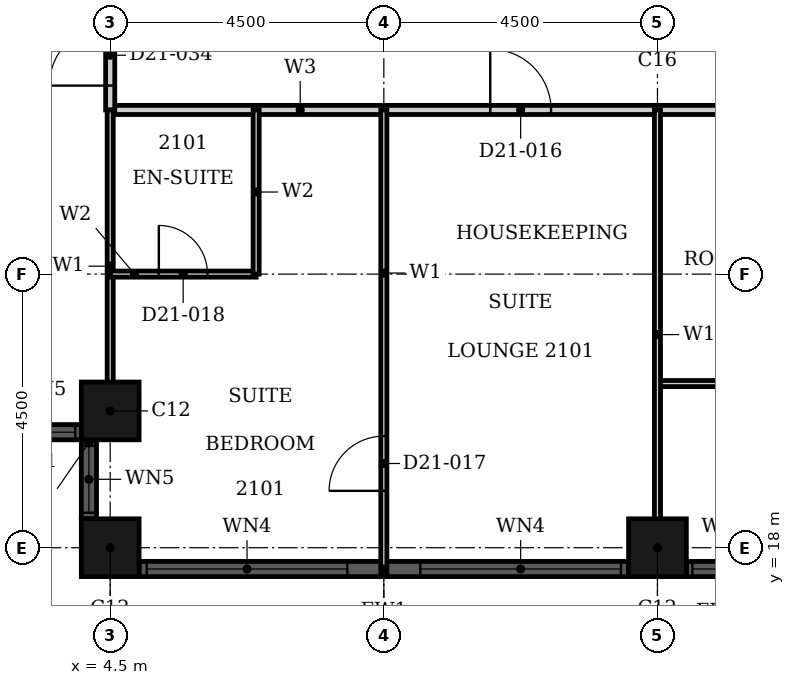
"""IFC4 building model, lengths in metres.
Left out: names, types, materials, properties, quantities, classifications, styles, units other than length and angle.
Written with IfcOpenShell. Run it as: python <this file> out.ifc"""

import sys

from ifc_helpers import new_model, si_unit, direction, frame, frame_2d, origin, origin_2d, place, context, subcontext, project, spatial, rectangle, hollow_rectangle, extrude, element, fill, save


model = new_model("IFC4")
c1 = context("Model", 3, precision=1e-05, world=origin(), true_north=direction((0.0, 1.0)))
c2 = subcontext(c1, "Body", "Model", "MODEL_VIEW")
j1 = project(units=[si_unit("LENGTHUNIT", "METRE"), si_unit("PLANEANGLEUNIT", "RADIAN")], contexts=[c1])
p1 = place(None, origin())
s1 = spatial("IfcSite", under=j1, at=p1, CompositionType="ELEMENT")
p2 = place(p1, origin())
s2 = spatial("IfcBuilding", under=s1, at=p2, CompositionType="ELEMENT")
p3 = place(p2, frame((0.0, 0.0, 88.8)))
s3 = spatial("IfcBuildingStorey", under=s2, at=p3, CompositionType="ELEMENT", Elevation=88.8)
for number, where, z_axis, x_axis in (
    (1, (4.5, 20.25, 0.0), (0.0, 0.0, 1.0), (1.0, 0.0, 0.0)),
    (2, (4.5, 18.0, 0.0), (0.0, 0.0, 1.0), (1.0, 0.0, 0.0)),
    (3, (13.5, 18.0, 0.0), (0.0, 0.0, 1.0), (1.0, 0.0, 0.0)),
):
    element("IfcColumn", number, at=place(p3, frame(where, z_axis=z_axis, x_axis=x_axis)), inside=s3, PredefinedType="COLUMN", context=c2, shape_type="SweptSolid", body=[
        extrude(hollow_rectangle(XDim=0.95, YDim=0.95, WallThickness=0.03, at=origin_2d()), origin(), (0.0, 0.0, 1.0), 3.6),
    ])
p4 = place(p3, frame((2.725, 19.9, 0.0), z_axis=(0.0, 0.0, 1.0), x_axis=(1.0, 0.0, 0.0)))
e4 = element("IfcWall", 4, at=p4, inside=s3, PredefinedType="SOLIDWALL", context=c2, shape_type="SweptSolid", body=[
    extrude(rectangle(XDim=1.3, YDim=0.25, at=frame_2d((0.65, 0.0))), origin(), (0.0, 0.0, 1.0), 3.6),
])
p5 = place(p4, frame((0.1, 0.0, 0.9)))
e5 = element("IfcOpeningElement", 5, at=p5, cuts=e4, PredefinedType="OPENING", context=c2, shape_type="SweptSolid", body=[
    extrude(rectangle(XDim=1.1, YDim=2.08, at=frame_2d((0.55, 1.04))), frame((0.0, 0.135, 0.0), z_axis=(0.0, -1.0, 0.0), x_axis=(1.0, 0.0, 0.0)), (0.0, 0.0, 1.0), 0.27),
])
p6 = place(p3, frame((4.15, 19.775, 0.0), z_axis=(0.0, 0.0, 1.0), x_axis=(0.0, -1.0, 0.0)))
e6 = element("IfcWall", 6, at=p6, inside=s3, PredefinedType="SOLIDWALL", context=c2, shape_type="SweptSolid", body=[
    extrude(rectangle(XDim=1.3, YDim=0.25, at=frame_2d((0.65, 0.0))), origin(), (0.0, 0.0, 1.0), 3.6),
])
p7 = place(p6, frame((0.1, 0.0, 0.9)))
e7 = element("IfcOpeningElement", 7, at=p7, cuts=e6, PredefinedType="OPENING", context=c2, shape_type="SweptSolid", body=[
    extrude(rectangle(XDim=1.1, YDim=2.08, at=frame_2d((0.55, 1.04))), frame((0.0, 0.135, 0.0), z_axis=(0.0, -1.0, 0.0), x_axis=(1.0, 0.0, 0.0)), (0.0, 0.0, 1.0), 0.27),
])
p8 = place(p3, frame((4.975, 17.65, 0.0), z_axis=(0.0, 0.0, 1.0), x_axis=(1.0, 0.0, 0.0)))
e8 = element("IfcWall", 8, at=p8, inside=s3, PredefinedType="SOLIDWALL", context=c2, shape_type="SweptSolid", body=[
    extrude(rectangle(XDim=8.05, YDim=0.25, at=frame_2d((4.025, 0.0))), origin(), (0.0, 0.0, 1.0), 3.6),
])
p9 = place(p8, frame((0.125, 0.0, 0.9)))
e9 = element("IfcOpeningElement", 9, at=p9, cuts=e8, PredefinedType="OPENING", context=c2, shape_type="SweptSolid", body=[
    extrude(rectangle(XDim=3.3, YDim=2.08, at=frame_2d((1.65, 1.04))), frame((0.0, 0.135, 0.0), z_axis=(0.0, -1.0, 0.0), x_axis=(1.0, 0.0, 0.0)), (0.0, 0.0, 1.0), 0.27),
])
p10 = place(p8, frame((4.625, 0.0, 0.9)))
e10 = element("IfcOpeningElement", 10, at=p10, cuts=e8, PredefinedType="OPENING", context=c2, shape_type="SweptSolid", body=[
    extrude(rectangle(XDim=3.3, YDim=2.08, at=frame_2d((1.65, 1.04))), frame((0.0, 0.135, 0.0), z_axis=(0.0, -1.0, 0.0), x_axis=(1.0, 0.0, 0.0)), (0.0, 0.0, 1.0), 0.27),
])
p11 = place(p3, frame((13.975, 17.65, 0.0), z_axis=(0.0, 0.0, 1.0), x_axis=(1.0, 0.0, 0.0)))
e11 = element("IfcWall", 11, at=p11, inside=s3, PredefinedType="SOLIDWALL", context=c2, shape_type="SweptSolid", body=[
    extrude(rectangle(XDim=1.3, YDim=0.25, at=frame_2d((0.65, 0.0))), origin(), (0.0, 0.0, 1.0), 3.6),
])
p12 = place(p11, frame((0.1, 0.0, 0.9)))
e12 = element("IfcOpeningElement", 12, at=p12, cuts=e11, PredefinedType="OPENING", context=c2, shape_type="SweptSolid", body=[
    extrude(rectangle(XDim=1.1, YDim=2.08, at=frame_2d((0.55, 1.04))), frame((0.0, 0.135, 0.0), z_axis=(0.0, -1.0, 0.0), x_axis=(1.0, 0.0, 0.0)), (0.0, 0.0, 1.0), 0.27),
])
p13 = place(p3, frame((4.5, 25.2, 0.0), z_axis=(0.0, 0.0, 1.0), x_axis=(1.0, 0.0, 0.0)))
e13 = element("IfcWall", 13, at=p13, inside=s3, PredefinedType="PARTITIONING", context=c2, shape_type="SweptSolid", body=[
    extrude(rectangle(XDim=11.7, YDim=0.15, at=frame_2d((5.85, 0.0))), origin(), (0.0, 0.0, 1.0), 3.3),
])
p14 = place(p13, frame((6.25, 0.0, 0.0)))
e14 = element("IfcOpeningElement", 14, at=p14, cuts=e13, PredefinedType="OPENING", context=c2, shape_type="SweptSolid", body=[
    extrude(rectangle(XDim=1.0, YDim=2.1, at=frame_2d((0.5, 1.05))), frame((0.0, 0.085, 0.0), z_axis=(0.0, -1.0, 0.0), x_axis=(1.0, 0.0, 0.0)), (0.0, 0.0, 1.0), 0.17),
])
p15 = place(p3, frame((4.5, 25.2, 0.0), z_axis=(0.0, 0.0, 1.0), x_axis=(0.0, 1.0, 0.0)))
e15 = element("IfcWall", 15, at=p15, inside=s3, PredefinedType="PARTITIONING", context=c2, shape_type="SweptSolid", body=[
    extrude(rectangle(XDim=1.8, YDim=0.15, at=frame_2d((0.9, 0.0))), origin(), (0.0, 0.0, 1.0), 3.3),
])
p16 = place(p15, frame((0.4, 0.0, 0.0)))
e16 = element("IfcOpeningElement", 16, at=p16, cuts=e15, PredefinedType="OPENING", context=c2, shape_type="SweptSolid", body=[
    extrude(rectangle(XDim=1.0, YDim=2.1, at=frame_2d((0.5, 1.05))), frame((0.0, 0.085, 0.0), z_axis=(0.0, -1.0, 0.0), x_axis=(1.0, 0.0, 0.0)), (0.0, 0.0, 1.0), 0.17),
])
p17 = place(p3, frame((13.5, 20.7, 0.0), z_axis=(0.0, 0.0, 1.0), x_axis=(1.0, 0.0, 0.0)))
e17 = element("IfcWall", 17, at=p17, inside=s3, PredefinedType="PARTITIONING", context=c2, shape_type="SweptSolid", body=[
    extrude(rectangle(XDim=2.7, YDim=0.1, at=frame_2d((1.35, 0.0))), origin(), (0.0, 0.0, 1.0), 3.3),
])
p18 = place(p3, frame((13.5, 17.81, 0.0), z_axis=(0.0, 0.0, 1.0), x_axis=(0.0, 1.0, 0.0)))
e18 = element("IfcWall", 18, at=p18, inside=s3, PredefinedType="PARTITIONING", context=c2, shape_type="SweptSolid", body=[
    extrude(rectangle(XDim=7.39, YDim=0.1, at=frame_2d((3.695, 0.0))), origin(), (0.0, 0.0, 1.0), 2.38),
])
p19 = place(p3, frame((4.5, 20.06, 0.0), z_axis=(0.0, 0.0, 1.0), x_axis=(0.0, 1.0, 0.0)))
e19 = element("IfcWall", 19, at=p19, inside=s3, PredefinedType="PARTITIONING", context=c2, shape_type="SweptSolid", body=[
    extrude(rectangle(XDim=5.14, YDim=0.1, at=frame_2d((2.57, 0.0))), origin(), (0.0, 0.0, 1.0), 3.3),
])
p20 = place(p3, frame((9.0, 17.585, 0.0), z_axis=(0.0, 0.0, 1.0), x_axis=(0.0, 1.0, 0.0)))
e20 = element("IfcWall", 20, at=p20, inside=s3, PredefinedType="PARTITIONING", context=c2, shape_type="SweptSolid", body=[
    extrude(rectangle(XDim=7.615, YDim=0.1, at=frame_2d((3.808, 0.0))), origin(), (0.0, 0.0, 1.0), 3.3),
])
p21 = place(p20, frame((1.35, 0.0, 0.0)))
e21 = element("IfcOpeningElement", 21, at=p21, cuts=e20, PredefinedType="OPENING", context=c2, shape_type="SweptSolid", body=[
    extrude(rectangle(XDim=0.9, YDim=2.1, at=frame_2d((0.45, 1.05))), frame((0.0, 0.06, 0.0), z_axis=(0.0, -1.0, 0.0), x_axis=(1.0, 0.0, 0.0)), (0.0, 0.0, 1.0), 0.12),
])
p22 = place(p3, frame((4.5, 22.5, 0.0), z_axis=(0.0, 0.0, 1.0), x_axis=(1.0, 0.0, 0.0)))
e22 = element("IfcWall", 22, at=p22, inside=s3, PredefinedType="PARTITIONING", context=c2, shape_type="SweptSolid", body=[
    extrude(rectangle(XDim=2.4, YDim=0.1, at=frame_2d((1.2, 0.0))), origin(), (0.0, 0.0, 1.0), 2.58),
])
p23 = place(p22, frame((0.8, 0.0, 0.0)))
e23 = element("IfcOpeningElement", 23, at=p23, cuts=e22, PredefinedType="OPENING", context=c2, shape_type="SweptSolid", body=[
    extrude(rectangle(XDim=0.8, YDim=2.1, at=frame_2d((0.4, 1.05))), frame((0.0, 0.06, 0.0), z_axis=(0.0, -1.0, 0.0), x_axis=(1.0, 0.0, 0.0)), (0.0, 0.0, 1.0), 0.12),
])
p24 = place(p3, frame((6.9, 22.5, 0.0), z_axis=(0.0, 0.0, 1.0), x_axis=(0.0, 1.0, 0.0)))
e24 = element("IfcWall", 24, at=p24, inside=s3, PredefinedType="PARTITIONING", context=c2, shape_type="SweptSolid", body=[
    extrude(rectangle(XDim=2.7, YDim=0.1, at=frame_2d((1.35, 0.0))), origin(), (0.0, 0.0, 1.0), 3.3),
])
p25 = place(p5, origin())
e25 = element("IfcWindow", 25, at=p25, inside=s3, PartitioningType="SINGLE_PANEL", PredefinedType="WINDOW", context=c2, shape_type="SweptSolid", body=[
    extrude(rectangle(XDim=1.1, YDim=2.08, at=frame_2d((0.55, 1.04))), frame((0.0, 0.03, 0.0), z_axis=(0.0, -1.0, 0.0), x_axis=(1.0, 0.0, 0.0)), (0.0, 0.0, 1.0), 0.06),
])
fill(e5, e25)
p26 = place(p7, origin())
e26 = element("IfcWindow", 26, at=p26, inside=s3, PartitioningType="SINGLE_PANEL", PredefinedType="WINDOW", context=c2, shape_type="SweptSolid", body=[
    extrude(rectangle(XDim=1.1, YDim=2.08, at=frame_2d((0.55, 1.04))), frame((0.0, 0.03, 0.0), z_axis=(0.0, -1.0, 0.0), x_axis=(1.0, 0.0, 0.0)), (0.0, 0.0, 1.0), 0.06),
])
fill(e7, e26)
p27 = place(p9, origin())
e27 = element("IfcWindow", 27, at=p27, inside=s3, PartitioningType="SINGLE_PANEL", PredefinedType="WINDOW", context=c2, shape_type="SweptSolid", body=[
    extrude(rectangle(XDim=3.3, YDim=2.08, at=frame_2d((1.65, 1.04))), frame((0.0, 0.03, 0.0), z_axis=(0.0, -1.0, 0.0), x_axis=(1.0, 0.0, 0.0)), (0.0, 0.0, 1.0), 0.06),
])
fill(e9, e27)
p28 = place(p10, origin())
e28 = element("IfcWindow", 28, at=p28, inside=s3, PartitioningType="SINGLE_PANEL", PredefinedType="WINDOW", context=c2, shape_type="SweptSolid", body=[
    extrude(rectangle(XDim=3.3, YDim=2.08, at=frame_2d((1.65, 1.04))), frame((0.0, 0.03, 0.0), z_axis=(0.0, -1.0, 0.0), x_axis=(1.0, 0.0, 0.0)), (0.0, 0.0, 1.0), 0.06),
])
fill(e10, e28)
p29 = place(p12, origin())
e29 = element("IfcWindow", 29, at=p29, inside=s3, PartitioningType="SINGLE_PANEL", PredefinedType="WINDOW", context=c2, shape_type="SweptSolid", body=[
    extrude(rectangle(XDim=1.1, YDim=2.08, at=frame_2d((0.55, 1.04))), frame((0.0, 0.03, 0.0), z_axis=(0.0, -1.0, 0.0), x_axis=(1.0, 0.0, 0.0)), (0.0, 0.0, 1.0), 0.06),
])
fill(e12, e29)
p30 = place(p14, origin())
e30 = element("IfcDoor", 30, at=p30, inside=s3, OperationType="SINGLE_SWING_RIGHT", PredefinedType="DOOR", context=c2, shape_type="SweptSolid", body=[
    extrude(rectangle(XDim=1.0, YDim=2.1, at=frame_2d((0.5, 1.05))), frame((0.0, 0.025, 0.0), z_axis=(0.0, -1.0, 0.0), x_axis=(1.0, 0.0, 0.0)), (0.0, 0.0, 1.0), 0.05),
])
fill(e14, e30)
p31 = place(p21, origin())
e31 = element("IfcDoor", 31, at=p31, inside=s3, OperationType="SINGLE_SWING_LEFT", PredefinedType="DOOR", context=c2, shape_type="SweptSolid", body=[
    extrude(rectangle(XDim=0.9, YDim=2.1, at=frame_2d((0.45, 1.05))), frame((0.0, 0.025, 0.0), z_axis=(0.0, -1.0, 0.0), x_axis=(1.0, 0.0, 0.0)), (0.0, 0.0, 1.0), 0.05),
])
fill(e21, e31)
p32 = place(p23, origin())
e32 = element("IfcDoor", 32, at=p32, inside=s3, OperationType="SINGLE_SWING_RIGHT", PredefinedType="DOOR", context=c2, shape_type="SweptSolid", body=[
    extrude(rectangle(XDim=0.8, YDim=2.1, at=frame_2d((0.4, 1.05))), frame((0.0, 0.025, 0.0), z_axis=(0.0, -1.0, 0.0), x_axis=(1.0, 0.0, 0.0)), (0.0, 0.0, 1.0), 0.05),
])
fill(e23, e32)
p33 = place(p16, origin())
e33 = element("IfcDoor", 33, at=p33, inside=s3, OperationType="SINGLE_SWING_LEFT", PredefinedType="DOOR", context=c2, shape_type="SweptSolid", body=[
    extrude(rectangle(XDim=1.0, YDim=2.1, at=frame_2d((0.5, 1.05))), frame((0.0, 0.025, 0.0), z_axis=(0.0, -1.0, 0.0), x_axis=(1.0, 0.0, 0.0)), (0.0, 0.0, 1.0), 0.05),
])
fill(e16, e33)
save(model, sys.argv[1])
